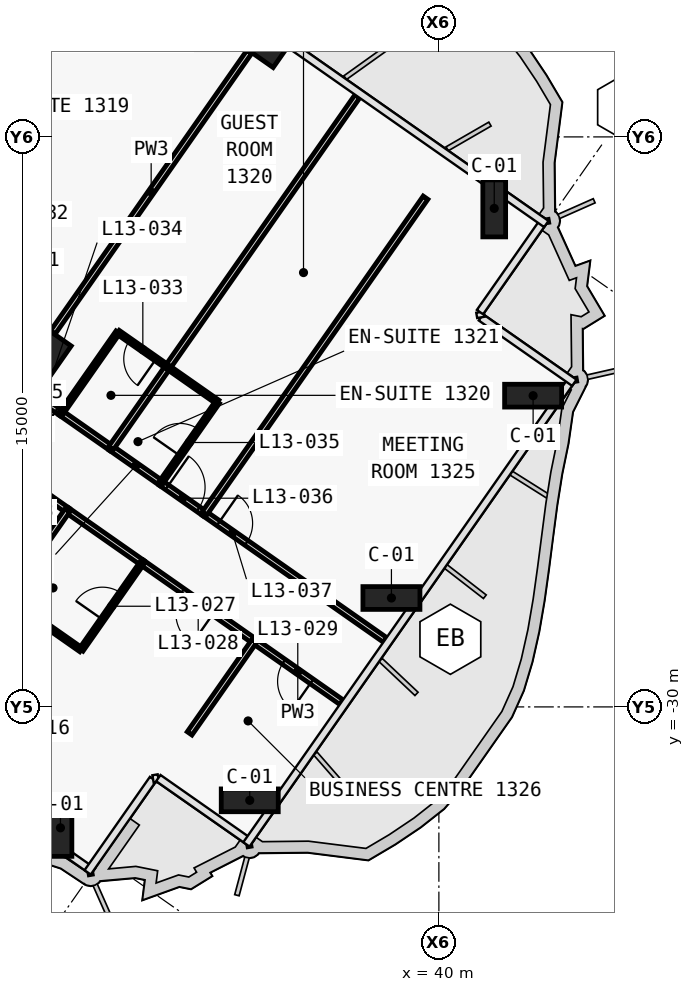
"""IFC4 building model, lengths in metres.
Left out: names, types, materials, properties, quantities, classifications, styles, units other than length and angle.
Written with IfcOpenShell. Run it as: python <this file> out.ifc"""

import sys

from ifc_helpers import new_model, si_unit, direction, frame, frame_2d, origin, origin_2d, place, context, subcontext, project, spatial, rectangle, extrude, clip, halfspace, element, fill, save


model = new_model("IFC4")
c1 = context("Model", 3, precision=1e-05, world=origin(), true_north=direction((0.0, 1.0)))
c2 = subcontext(c1, "Body", "Model", "MODEL_VIEW")
j1 = project(units=[si_unit("LENGTHUNIT", "METRE"), si_unit("PLANEANGLEUNIT", "RADIAN")], contexts=[c1])
p1 = place(None, origin())
s1 = spatial("IfcSite", under=j1, at=p1, CompositionType="ELEMENT")
p2 = place(p1, origin())
s2 = spatial("IfcBuilding", under=s1, at=p2, CompositionType="ELEMENT")
p3 = place(p2, frame((0.0, 0.0, 72.5)))
s3 = spatial("IfcBuildingStorey", under=s2, at=p3, CompositionType="ELEMENT", Elevation=72.5)
p4 = place(p3, frame((30.336, -33.388, 0.0), z_axis=(-0.502949209434, 0.352179537956, 0.789310880309), x_axis=(0.646559152129, -0.45273936053, 0.613993757481)))
e1 = element("IfcColumn", 1, at=p4, inside=s3, PredefinedType="COLUMN", context=c2, shape_type="Clipping", body=[
    clip(clip(extrude(rectangle(XDim=1.5, YDim=0.6, at=origin_2d()), origin(), (0.0, 0.0, 1.0), 4.561), halfspace(frame((0.0, 0.0, 0.583), z_axis=(0.0, 0.0, 1.0), x_axis=(1.0, 0.0, 0.0)), True)), halfspace(frame((0.0, 0.0, 3.977), z_axis=(0.0, 0.0, 1.0), x_axis=(1.0, 0.0, 0.0)), False)),
])
p5 = place(p3, frame((35.197, -12.498, 0.0), z_axis=(0.0, 0.0, 1.0), x_axis=(0.819152044289, -0.573576436351, 0.0)))
e2 = element("IfcColumn", 2, at=p5, inside=s3, PredefinedType="COLUMN", context=c2, shape_type="SweptSolid", body=[
    extrude(rectangle(XDim=1.5, YDim=0.6, at=origin_2d()), origin(), (0.0, 0.0, 1.0), 3.6),
])
p6 = place(p3, frame((41.75, -17.087, 0.0), z_axis=(-0.502908210177, 0.3521292646, 0.789359432166), x_axis=(0.646611950122, -0.452748604756, 0.613931337245)))
e3 = element("IfcColumn", 3, at=p6, inside=s3, PredefinedType="COLUMN", context=c2, shape_type="Clipping", body=[
    clip(clip(extrude(rectangle(XDim=1.5, YDim=0.6, at=origin_2d()), origin(), (0.0, 0.0, 1.0), 4.561), halfspace(frame((0.0, 0.0, 0.583), z_axis=(0.0, 0.0, 1.0), x_axis=(1.0, 0.0, 0.0)), True)), halfspace(frame((0.0, 0.0, 3.977), z_axis=(0.0, 0.0, 1.0), x_axis=(1.0, 0.0, 0.0)), False)),
])
for number, where, z_axis, x_axis in (
    (4, (35.141, -32.541, 0.0), (-0.503, 0.352, 0.789), (0.574, 0.819, 0.0)),
    (5, (38.869, -27.216, 0.0), (-0.503, 0.352, 0.789), (0.574, 0.819, 0.0)),
    (6, (42.597, -21.892, 0.0), (-0.503, 0.352, 0.789), (0.574, 0.819, 0.0)),
):
    element("IfcColumn", number, at=place(p3, frame(where, z_axis=z_axis, x_axis=x_axis)), inside=s3, PredefinedType="COLUMN", context=c2, shape_type="Clipping", body=[
        clip(clip(extrude(rectangle(XDim=1.5, YDim=0.6, at=origin_2d()), origin(), (0.0, 0.0, 1.0), 4.561), halfspace(frame((0.0, 0.0, 0.233), z_axis=(0.0, 0.0, 1.0), x_axis=(1.0, 0.0, 0.0)), True)), halfspace(frame((0.0, 0.0, 4.327), z_axis=(0.0, 0.0, 1.0), x_axis=(1.0, 0.0, 0.0)), False)),
    ])
p7 = place(p3, frame((29.49, -20.649, 0.0), z_axis=(0.0, 0.0, 1.0), x_axis=(0.819152044289, -0.573576436351, 0.0)))
e7 = element("IfcColumn", 7, at=p7, inside=s3, PredefinedType="COLUMN", context=c2, shape_type="SweptSolid", body=[
    extrude(rectangle(XDim=1.2, YDim=1.2, at=origin_2d()), origin(), (0.0, 0.0, 1.0), 3.6),
])
p8 = place(p3, frame((30.063, -22.271, 0.0), z_axis=(0.0, 0.0, 1.0), x_axis=(-0.81914197737, 0.573590813132, 0.0)))
e8 = element("IfcWall", 8, at=p8, inside=s3, PredefinedType="PARTITIONING", context=c2, shape_type="SweptSolid", body=[
    extrude(rectangle(XDim=1.403, YDim=0.15, at=frame_2d((0.701, 0.0))), origin(), (0.0, 0.0, 1.0), 2.6),
])
p9 = place(p8, frame((0.15, 0.0, 0.0)))
e9 = element("IfcOpeningElement", 9, at=p9, cuts=e8, PredefinedType="OPENING", context=c2, shape_type="SweptSolid", body=[
    extrude(rectangle(XDim=0.85, YDim=2.1, at=frame_2d((0.425, 1.05))), frame((0.0, 0.085, 0.0), z_axis=(0.0, -1.0, 0.0), x_axis=(1.0, 0.0, 0.0)), (0.0, 0.0, 1.0), 0.17),
])
p10 = place(p3, frame((30.061, -22.27, 0.0), z_axis=(0.0, 0.0, 1.0), x_axis=(0.819189013667, -0.573523634986, 0.0)))
e10 = element("IfcWall", 10, at=p10, inside=s3, PredefinedType="PARTITIONING", context=c2, shape_type="SweptSolid", body=[
    extrude(rectangle(XDim=1.604, YDim=0.15, at=frame_2d((0.802, 0.0))), origin(), (0.0, 0.0, 1.0), 3.32),
])
p11 = place(p3, frame((32.683, -24.106, 0.0), z_axis=(0.0, 0.0, 1.0), x_axis=(0.819199220913, -0.573509055252, 0.0)))
e11 = element("IfcWall", 11, at=p11, inside=s3, PredefinedType="PARTITIONING", context=c2, shape_type="SweptSolid", body=[
    extrude(rectangle(XDim=1.403, YDim=0.15, at=frame_2d((0.702, 0.0))), origin(), (0.0, 0.0, 1.0), 3.32),
])
p12 = place(p11, frame((0.201, 0.0, 0.0)))
e12 = element("IfcOpeningElement", 12, at=p12, cuts=e11, PredefinedType="OPENING", context=c2, shape_type="SweptSolid", body=[
    extrude(rectangle(XDim=1.0, YDim=2.1, at=frame_2d((0.5, 1.05))), frame((0.0, 0.085, 0.0), z_axis=(0.0, -1.0, 0.0), x_axis=(1.0, 0.0, 0.0)), (0.0, 0.0, 1.0), 0.17),
])
p13 = place(p3, frame((31.372, -23.188, 0.0), z_axis=(0.0, 0.0, 1.0), x_axis=(0.819189013667, -0.573523634986, 0.0)))
e13 = element("IfcWall", 13, at=p13, inside=s3, PredefinedType="PARTITIONING", context=c2, shape_type="SweptSolid", body=[
    extrude(rectangle(XDim=1.604, YDim=0.15, at=frame_2d((0.802, 0.0))), origin(), (0.0, 0.0, 1.0), 3.32),
])
p14 = place(p3, frame((33.829, -24.908, 0.0), z_axis=(0.0, 0.0, 1.0), x_axis=(0.819150860942, -0.573578126342, 0.0)))
e14 = element("IfcWall", 14, at=p14, inside=s3, PredefinedType="PARTITIONING", context=c2, shape_type="SweptSolid", body=[
    extrude(rectangle(XDim=5.802, YDim=0.15, at=frame_2d((2.901, 0.0))), origin(), (0.0, 0.0, 1.0), 2.5),
])
p15 = place(p14, frame((0.451, 0.0, 0.0)))
e15 = element("IfcOpeningElement", 15, at=p15, cuts=e14, PredefinedType="OPENING", context=c2, shape_type="SweptSolid", body=[
    extrude(rectangle(XDim=0.9, YDim=2.1, at=frame_2d((0.45, 1.05))), frame((0.0, 0.085, 0.0), z_axis=(0.0, -1.0, 0.0), x_axis=(1.0, 0.0, 0.0)), (0.0, 0.0, 1.0), 0.17),
])
p16 = place(p3, frame((30.228, -24.828, 0.0), z_axis=(0.0, 0.0, 1.0), x_axis=(-0.819145961204, 0.573585123798, 0.0)))
e16 = element("IfcWall", 16, at=p16, inside=s3, PredefinedType="PARTITIONING", context=c2, shape_type="SweptSolid", body=[
    extrude(rectangle(XDim=3.603, YDim=0.15, at=frame_2d((1.802, 0.0))), origin(), (0.0, 0.0, 1.0), 2.6),
])
p17 = place(p16, frame((1.302, 0.0, 0.0)))
e17 = element("IfcOpeningElement", 17, at=p17, cuts=e16, PredefinedType="OPENING", context=c2, shape_type="SweptSolid", body=[
    extrude(rectangle(XDim=1.0, YDim=2.1, at=frame_2d((0.5, 1.05))), frame((0.0, 0.085, 0.0), z_axis=(0.0, -1.0, 0.0), x_axis=(1.0, 0.0, 0.0)), (0.0, 0.0, 1.0), 0.17),
])
p18 = place(p3, frame((35.143, -28.27, 0.0), z_axis=(0.0, 0.0, 1.0), x_axis=(-0.819145961204, 0.573585123798, 0.0)))
e18 = element("IfcWall", 18, at=p18, inside=s3, PredefinedType="PARTITIONING", context=c2, shape_type="SweptSolid", body=[
    extrude(rectangle(XDim=3.603, YDim=0.15, at=frame_2d((1.802, 0.0))), origin(), (0.0, 0.0, 1.0), 2.5),
])
p19 = place(p18, frame((1.302, 0.0, 0.0)))
e19 = element("IfcOpeningElement", 19, at=p19, cuts=e18, PredefinedType="OPENING", context=c2, shape_type="SweptSolid", body=[
    extrude(rectangle(XDim=1.0, YDim=2.1, at=frame_2d((0.5, 1.05))), frame((0.0, 0.085, 0.0), z_axis=(0.0, -1.0, 0.0), x_axis=(1.0, 0.0, 0.0)), (0.0, 0.0, 1.0), 0.17),
])
p20 = place(p3, frame((32.194, -26.205, 0.0), z_axis=(0.0, 0.0, 1.0), x_axis=(-0.819146032251, 0.573585022335, 0.0)))
e20 = element("IfcWall", 20, at=p20, inside=s3, PredefinedType="PARTITIONING", context=c2, shape_type="SweptSolid", body=[
    extrude(rectangle(XDim=2.404, YDim=0.15, at=frame_2d((1.202, 0.0))), origin(), (0.0, 0.0, 1.0), 3.32),
])
p21 = place(p3, frame((37.435, -29.875, 0.0), z_axis=(0.0, 0.0, 1.0), x_axis=(-0.819125488359, 0.573614360281, 0.0)))
e21 = element("IfcWall", 21, at=p21, inside=s3, PredefinedType="PARTITIONING", context=c2, shape_type="SweptSolid", body=[
    extrude(rectangle(XDim=2.802, YDim=0.15, at=frame_2d((1.401, 0.0))), origin(), (0.0, 0.0, 1.0), 2.5),
])
p22 = place(p21, frame((0.951, 0.0, 0.0)))
e22 = element("IfcOpeningElement", 22, at=p22, cuts=e21, PredefinedType="OPENING", context=c2, shape_type="SweptSolid", body=[
    extrude(rectangle(XDim=0.9, YDim=2.1, at=frame_2d((0.45, 1.05))), frame((0.0, 0.085, 0.0), z_axis=(0.0, -1.0, 0.0), x_axis=(1.0, 0.0, 0.0)), (0.0, 0.0, 1.0), 0.17),
])
p23 = place(p3, frame((30.482, -8.77, 0.0), z_axis=(0.0, 0.0, 1.0), x_axis=(-0.573576058406, -0.819152308929, 0.0)))
e23 = element("IfcWall", 23, at=p23, inside=s3, PredefinedType="PARTITIONING", context=c2, shape_type="SweptSolid", body=[
    extrude(rectangle(XDim=8.501, YDim=0.15, at=frame_2d((4.25, 0.0))), origin(), (0.0, 0.0, 1.0), 2.6),
])
p24 = place(p3, frame((35.013, -12.76, 0.0), z_axis=(0.0, 0.0, 1.0), x_axis=(-0.573558725113, -0.819164445546, 0.0)))
e24 = element("IfcWall", 24, at=p24, inside=s3, PredefinedType="PARTITIONING", context=c2, shape_type="SweptSolid", body=[
    extrude(rectangle(XDim=9.01, YDim=0.15, at=frame_2d((4.505, 0.0))), origin(), (0.0, 0.0, 1.0), 2.6),
])
p25 = place(p3, frame((32.865, -21.058, 0.0), z_axis=(0.0, 0.0, 1.0), x_axis=(-0.819131543282, 0.57360571371, 0.0)))
e25 = element("IfcWall", 25, at=p25, inside=s3, PredefinedType="PARTITIONING", context=c2, shape_type="SweptSolid", body=[
    extrude(rectangle(XDim=1.6, YDim=0.12, at=frame_2d((0.8, 0.0))), origin(), (0.0, 0.0, 1.0), 3.32),
])
p26 = place(p25, frame((0.375, 0.0, 0.0)))
e26 = element("IfcOpeningElement", 26, at=p26, cuts=e25, PredefinedType="OPENING", context=c2, shape_type="SweptSolid", body=[
    extrude(rectangle(XDim=0.85, YDim=2.05, at=frame_2d((0.425, 1.025))), frame((0.0, 0.07, 0.0), z_axis=(0.0, -1.0, 0.0), x_axis=(1.0, 0.0, 0.0)), (0.0, 0.0, 1.0), 0.14),
])
p27 = place(p3, frame((31.553, -20.14, 0.0), z_axis=(0.0, 0.0, 1.0), x_axis=(-0.573537965655, -0.819178980414, 0.0)))
e27 = element("IfcWall", 27, at=p27, inside=s3, PredefinedType="PARTITIONING", context=c2, shape_type="SweptSolid", body=[
    extrude(rectangle(XDim=2.6, YDim=0.12, at=frame_2d((1.3, 0.0))), origin(), (0.0, 0.0, 1.0), 2.6),
])
p28 = place(p3, frame((37.855, -13.932, 0.0), z_axis=(0.0, 0.0, 1.0), x_axis=(-0.573564051961, -0.819160715792, 0.0)))
e28 = element("IfcWall", 28, at=p28, inside=s3, PredefinedType="PARTITIONING", context=c2, shape_type="SweptSolid", body=[
    extrude(rectangle(XDim=8.699, YDim=0.15, at=frame_2d((4.35, 0.0))), origin(), (0.0, 0.0, 1.0), 2.5),
])
p29 = place(p3, frame((32.865, -21.059, 0.0), z_axis=(0.0, 0.0, 1.0), x_axis=(-0.573600972199, -0.819134863556, 0.0)))
e29 = element("IfcWall", 29, at=p29, inside=s3, PredefinedType="PARTITIONING", context=c2, shape_type="SweptSolid", body=[
    extrude(rectangle(XDim=2.6, YDim=0.15, at=frame_2d((1.3, 0.0))), origin(), (0.0, 0.0, 1.0), 2.6),
])
p30 = place(p3, frame((32.685, -24.107, 0.0), z_axis=(0.0, 0.0, 1.0), x_axis=(0.573537965655, 0.819178980414, 0.0)))
e30 = element("IfcWall", 30, at=p30, inside=s3, PredefinedType="PARTITIONING", context=c2, shape_type="SweptSolid", body=[
    extrude(rectangle(XDim=2.6, YDim=0.12, at=frame_2d((1.3, 0.0))), origin(), (0.0, 0.0, 1.0), 2.6),
])
p31 = place(p30, frame((0.875, 0.0, 0.0)))
e31 = element("IfcOpeningElement", 31, at=p31, cuts=e30, PredefinedType="OPENING", context=c2, shape_type="SweptSolid", body=[
    extrude(rectangle(XDim=0.85, YDim=2.05, at=frame_2d((0.425, 1.025))), frame((0.0, 0.07, 0.0), z_axis=(0.0, -1.0, 0.0), x_axis=(1.0, 0.0, 0.0)), (0.0, 0.0, 1.0), 0.14),
])
p32 = place(p3, frame((34.176, -21.976, 0.0), z_axis=(0.0, 0.0, 1.0), x_axis=(-0.819203241359, 0.573503312412, 0.0)))
e32 = element("IfcWall", 32, at=p32, inside=s3, PredefinedType="PARTITIONING", context=c2, shape_type="SweptSolid", body=[
    extrude(rectangle(XDim=1.6, YDim=0.12, at=frame_2d((0.8, 0.0))), origin(), (0.0, 0.0, 1.0), 3.32),
])
p33 = place(p3, frame((39.649, -16.6, 0.0), z_axis=(0.0, 0.0, 1.0), x_axis=(-0.573567334802, -0.819158417187, 0.0)))
e33 = element("IfcWall", 33, at=p33, inside=s3, PredefinedType="PARTITIONING", context=c2, shape_type="SweptSolid", body=[
    extrude(rectangle(XDim=10.144, YDim=0.15, at=frame_2d((5.072, 0.0))), origin(), (0.0, 0.0, 1.0), 2.6),
])
p34 = place(p3, frame((30.226, -24.827, 0.0), z_axis=(0.0, 0.0, 1.0), x_axis=(-0.573614360281, -0.819125488359, 0.0)))
e34 = element("IfcWall", 34, at=p34, inside=s3, PredefinedType="PARTITIONING", context=c2, shape_type="SweptSolid", body=[
    extrude(rectangle(XDim=2.802, YDim=0.15, at=frame_2d((1.401, 0.0))), origin(), (0.0, 0.0, 1.0), 3.32),
])
p35 = place(p3, frame((28.62, -27.121, 0.0), z_axis=(0.0, 0.0, 1.0), x_axis=(0.819141114317, -0.573592045652, 0.0)))
e35 = element("IfcWall", 35, at=p35, inside=s3, PredefinedType="PARTITIONING", context=c2, shape_type="SweptSolid", body=[
    extrude(rectangle(XDim=2.4, YDim=0.12, at=frame_2d((1.2, 0.0))), origin(), (0.0, 0.0, 1.0), 3.32),
])
p36 = place(p3, frame((30.587, -28.498, 0.0), z_axis=(0.0, 0.0, 1.0), x_axis=(0.573608623498, 0.819129505664, 0.0)))
e36 = element("IfcWall", 36, at=p36, inside=s3, PredefinedType="PARTITIONING", context=c2, shape_type="SweptSolid", body=[
    extrude(rectangle(XDim=2.8, YDim=0.12, at=frame_2d((1.4, 0.0))), origin(), (0.0, 0.0, 1.0), 3.32),
])
p37 = place(p36, frame((0.975, 0.0, 0.0)))
e37 = element("IfcOpeningElement", 37, at=p37, cuts=e36, PredefinedType="OPENING", context=c2, shape_type="SweptSolid", body=[
    extrude(rectangle(XDim=0.85, YDim=2.05, at=frame_2d((0.425, 1.025))), frame((0.0, 0.07, 0.0), z_axis=(0.0, -1.0, 0.0), x_axis=(1.0, 0.0, 0.0)), (0.0, 0.0, 1.0), 0.14),
])
p38 = place(p3, frame((35.141, -28.268, 0.0), z_axis=(0.0, 0.0, 1.0), x_axis=(-0.573578404522, -0.819150666157, 0.0)))
e38 = element("IfcWall", 38, at=p38, inside=s3, PredefinedType="PARTITIONING", context=c2, shape_type="SweptSolid", body=[
    extrude(rectangle(XDim=2.965, YDim=0.15, at=frame_2d((1.482, 0.0))), origin(), (0.0, 0.0, 1.0), 2.5),
])
p39 = place(p37, origin())
e39 = element("IfcDoor", 39, at=p39, inside=s3, OperationType="SINGLE_SWING_LEFT", PredefinedType="DOOR", context=c2, shape_type="SweptSolid", body=[
    extrude(rectangle(XDim=0.85, YDim=2.05, at=frame_2d((0.425, 1.025))), frame((0.0, 0.025, 0.0), z_axis=(0.0, -1.0, 0.0), x_axis=(1.0, 0.0, 0.0)), (0.0, 0.0, 1.0), 0.05),
])
fill(e37, e39)
p40 = place(p19, origin())
e40 = element("IfcDoor", 40, at=p40, inside=s3, OperationType="SINGLE_SWING_RIGHT", PredefinedType="DOOR", context=c2, shape_type="SweptSolid", body=[
    extrude(rectangle(XDim=1.0, YDim=2.1, at=frame_2d((0.5, 1.05))), frame((0.0, 0.025, 0.0), z_axis=(0.0, -1.0, 0.0), x_axis=(1.0, 0.0, 0.0)), (0.0, 0.0, 1.0), 0.05),
])
fill(e19, e40)
p41 = place(p22, origin())
e41 = element("IfcDoor", 41, at=p41, inside=s3, OperationType="SINGLE_SWING_LEFT", PredefinedType="DOOR", context=c2, shape_type="SweptSolid", body=[
    extrude(rectangle(XDim=0.9, YDim=2.1, at=frame_2d((0.45, 1.05))), frame((0.0, 0.025, 0.0), z_axis=(0.0, -1.0, 0.0), x_axis=(1.0, 0.0, 0.0)), (0.0, 0.0, 1.0), 0.05),
])
fill(e22, e41)
p42 = place(p26, origin())
e42 = element("IfcDoor", 42, at=p42, inside=s3, OperationType="SINGLE_SWING_LEFT", PredefinedType="DOOR", context=c2, shape_type="SweptSolid", body=[
    extrude(rectangle(XDim=0.85, YDim=2.05, at=frame_2d((0.425, 1.025))), frame((0.0, 0.025, 0.0), z_axis=(0.0, -1.0, 0.0), x_axis=(1.0, 0.0, 0.0)), (0.0, 0.0, 1.0), 0.05),
])
fill(e26, e42)
p43 = place(p9, origin())
e43 = element("IfcDoor", 43, at=p43, inside=s3, OperationType="SINGLE_SWING_LEFT", PredefinedType="DOOR", context=c2, shape_type="SweptSolid", body=[
    extrude(rectangle(XDim=0.85, YDim=2.1, at=frame_2d((0.425, 1.05))), frame((0.0, 0.025, 0.0), z_axis=(0.0, -1.0, 0.0), x_axis=(1.0, 0.0, 0.0)), (0.0, 0.0, 1.0), 0.05),
])
fill(e9, e43)
p44 = place(p31, origin())
e44 = element("IfcDoor", 44, at=p44, inside=s3, OperationType="SINGLE_SWING_RIGHT", PredefinedType="DOOR", context=c2, shape_type="SweptSolid", body=[
    extrude(rectangle(XDim=0.85, YDim=2.05, at=frame_2d((0.425, 1.025))), frame((0.0, 0.025, 0.0), z_axis=(0.0, -1.0, 0.0), x_axis=(1.0, 0.0, 0.0)), (0.0, 0.0, 1.0), 0.05),
])
fill(e31, e44)
p45 = place(p12, origin())
e45 = element("IfcDoor", 45, at=p45, inside=s3, OperationType="SINGLE_SWING_LEFT", PredefinedType="DOOR", context=c2, shape_type="SweptSolid", body=[
    extrude(rectangle(XDim=1.0, YDim=2.1, at=frame_2d((0.5, 1.05))), frame((0.0, 0.025, 0.0), z_axis=(0.0, -1.0, 0.0), x_axis=(1.0, 0.0, 0.0)), (0.0, 0.0, 1.0), 0.05),
])
fill(e12, e45)
p46 = place(p15, origin())
e46 = element("IfcDoor", 46, at=p46, inside=s3, OperationType="SINGLE_SWING_RIGHT", PredefinedType="DOOR", context=c2, shape_type="SweptSolid", body=[
    extrude(rectangle(XDim=0.9, YDim=2.1, at=frame_2d((0.45, 1.05))), frame((0.0, 0.025, 0.0), z_axis=(0.0, -1.0, 0.0), x_axis=(1.0, 0.0, 0.0)), (0.0, 0.0, 1.0), 0.05),
])
fill(e15, e46)
save(model, sys.argv[1])
